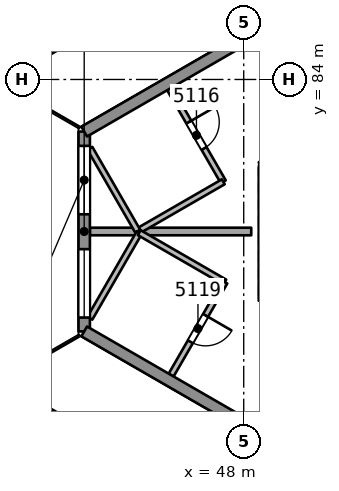
"""IFC4 building model, lengths in metres.
Left out: names, types, materials, properties, quantities, classifications, styles, units other than length and angle.
Written with IfcOpenShell. Run it as: python <this file> out.ifc"""

import sys

from ifc_helpers import new_model, si_unit, direction, frame, frame_2d, origin, place, context, subcontext, project, spatial, rectangle, extrude, element, fill, save


model = new_model("IFC4")
c1 = context("Model", 3, precision=1e-05, world=origin(), true_north=direction((0.0, 1.0)))
c2 = subcontext(c1, "Body", "Model", "MODEL_VIEW")
j1 = project(units=[si_unit("LENGTHUNIT", "METRE"), si_unit("PLANEANGLEUNIT", "RADIAN")], contexts=[c1])
p1 = place(None, origin())
s1 = spatial("IfcSite", under=j1, at=p1, CompositionType="ELEMENT")
p2 = place(p1, origin())
s2 = spatial("IfcBuilding", under=s1, at=p2, CompositionType="ELEMENT")
p3 = place(p2, frame((0.0, 0.0, 209.5)))
s3 = spatial("IfcBuildingStorey", under=s2, at=p3, CompositionType="ELEMENT", Elevation=209.5)
p4 = place(p3, frame((60.728, 88.682, 0.0), z_axis=(0.0, 0.0, 1.0), x_axis=(-0.866021613849, -0.500006564303, 0.0)))
e1 = element("IfcWall", 1, at=p4, inside=s3, PredefinedType="SHEAR", context=c2, shape_type="SweptSolid", body=[
    extrude(rectangle(XDim=14.108, YDim=0.45, at=frame_2d((7.054, 0.0))), origin(), (0.0, 0.0, 1.0), 3.7),
])
p5 = place(p3, frame((48.622, 81.693, 0.0), z_axis=(0.0, 0.0, 1.0), x_axis=(0.0, -1.0, 0.0)))
e2 = element("IfcWall", 2, at=p5, inside=s3, PredefinedType="SHEAR", context=c2, shape_type="SweptSolid", body=[
    extrude(rectangle(XDim=3.515, YDim=0.45, at=frame_2d((1.758, 0.0))), origin(), (0.0, 0.0, 1.0), 3.7),
])
p6 = place(p3, frame((46.05, 83.755, 0.0), z_axis=(0.0, 0.0, 1.0), x_axis=(0.500051559782, -0.865995633684, 0.0)))
e3 = element("IfcWall", 3, at=p6, inside=s3, PredefinedType="PARTITIONING", context=c2, shape_type="SweptSolid", body=[
    extrude(rectangle(XDim=2.825, YDim=0.15, at=frame_2d((1.413, 0.0))), origin(), (0.0, 0.0, 1.0), 3.3),
])
p7 = place(p6, frame((1.013, 0.0, 0.0)))
e4 = element("IfcOpeningElement", 4, at=p7, cuts=e3, PredefinedType="OPENING", context=c2, shape_type="SweptSolid", body=[
    extrude(rectangle(XDim=0.8, YDim=2.1, at=frame_2d((0.4, 1.05))), frame((0.0, 0.085, 0.0), z_axis=(0.0, -1.0, 0.0), x_axis=(1.0, 0.0, 0.0)), (0.0, 0.0, 1.0), 0.171),
])
p8 = place(p3, frame((47.462, 81.308, 0.0), z_axis=(0.0, 0.0, 1.0), x_axis=(-0.866021400173, -0.500006934395, 0.0)))
e5 = element("IfcWall", 5, at=p8, inside=s3, PredefinedType="PARTITIONING", context=c2, shape_type="SweptSolid", body=[
    extrude(rectangle(XDim=2.6, YDim=0.15, at=frame_2d((1.3, 0.0))), origin(), (0.0, 0.0, 1.0), 3.3),
])
p9 = place(p3, frame((45.211, 80.008, 0.0), z_axis=(0.0, 0.0, 1.0), x_axis=(-0.499954589381, 0.86605162003, 0.0)))
e6 = element("IfcWall", 6, at=p9, inside=s3, PredefinedType="PARTITIONING", context=c2, shape_type="SweptSolid", body=[
    extrude(rectangle(XDim=2.519, YDim=0.15, at=frame_2d((1.259, 0.0))), origin(), (0.0, 0.0, 1.0), 3.3),
])
p10 = place(p3, frame((43.951, 80.0, 0.0), z_axis=(0.0, 0.0, 1.0), x_axis=(1.0, 0.0, 0.0)))
e7 = element("IfcWall", 7, at=p10, inside=s3, PredefinedType="PARTITIONING", context=c2, shape_type="SweptSolid", body=[
    extrude(rectangle(XDim=4.247, YDim=0.2, at=frame_2d((2.123, 0.0))), origin(), (0.0, 0.0, 1.0), 3.3),
])
p11 = place(p3, frame((43.951, 77.718, 0.0), z_axis=(0.0, 0.0, 1.0), x_axis=(0.499988060406, 0.866032297002, 0.0)))
e8 = element("IfcWall", 8, at=p11, inside=s3, PredefinedType="PARTITIONING", context=c2, shape_type="SweptSolid", body=[
    extrude(rectangle(XDim=2.599, YDim=0.15, at=frame_2d((1.3, 0.0))), origin(), (0.0, 0.0, 1.0), 3.3),
])
p12 = place(p3, frame((45.251, 79.969, 0.0), z_axis=(0.0, 0.0, 1.0), x_axis=(0.866062058628, -0.499936506574, 0.0)))
e9 = element("IfcWall", 9, at=p12, inside=s3, PredefinedType="PARTITIONING", context=c2, shape_type="SweptSolid", body=[
    extrude(rectangle(XDim=2.6, YDim=0.15, at=frame_2d((1.3, 0.0))), origin(), (0.0, 0.0, 1.0), 3.3),
])
p13 = place(p3, frame((47.503, 78.669, 0.0), z_axis=(0.0, 0.0, 1.0), x_axis=(-0.500014143148, -0.86601723808, 0.0)))
e10 = element("IfcWall", 10, at=p13, inside=s3, PredefinedType="PARTITIONING", context=c2, shape_type="SweptSolid", body=[
    extrude(rectangle(XDim=2.826, YDim=0.15, at=frame_2d((1.413, 0.0))), origin(), (0.0, 0.0, 1.0), 3.3),
])
p14 = place(p13, frame((1.013, 0.0, 0.0)))
e11 = element("IfcOpeningElement", 11, at=p14, cuts=e10, PredefinedType="OPENING", context=c2, shape_type="SweptSolid", body=[
    extrude(rectangle(XDim=0.8, YDim=2.1, at=frame_2d((0.4, 1.05))), frame((0.0, 0.085, 0.0), z_axis=(0.0, -1.0, 0.0), x_axis=(1.0, 0.0, 0.0)), (0.0, 0.0, 1.0), 0.171),
])
p15 = place(p3, frame((43.802, 77.37, 0.0), z_axis=(0.0, 0.0, 1.0), x_axis=(0.0, 1.0, 0.0)))
e12 = element("IfcWall", 12, at=p15, inside=s3, PredefinedType="SOLIDWALL", context=c2, shape_type="SweptSolid", body=[
    extrude(rectangle(XDim=5.259, YDim=0.3, at=frame_2d((2.63, 0.0))), origin(), (0.0, 0.0, 1.0), 3.3),
])
p16 = place(p15, frame((3.082, 0.0, 0.9)))
e13 = element("IfcOpeningElement", 13, at=p16, cuts=e12, PredefinedType="OPENING", context=c2, shape_type="SweptSolid", body=[
    extrude(rectangle(XDim=1.8, YDim=1.5, at=frame_2d((0.9, 0.75))), frame((0.0, 0.161, 0.0), z_axis=(0.0, -1.0, 0.0), x_axis=(1.0, 0.0, 0.0)), (0.0, 0.0, 1.0), 0.321),
])
p17 = place(p15, frame((0.365, 0.0, 0.9)))
e14 = element("IfcOpeningElement", 14, at=p17, cuts=e12, PredefinedType="OPENING", context=c2, shape_type="SweptSolid", body=[
    extrude(rectangle(XDim=1.8, YDim=1.5, at=frame_2d((0.9, 0.75))), frame((0.0, 0.161, 0.0), z_axis=(0.0, -1.0, 0.0), x_axis=(1.0, 0.0, 0.0)), (0.0, 0.0, 1.0), 0.321),
])
p18 = place(p3, frame((43.802, 82.63, 0.0), z_axis=(0.0, 0.0, 1.0), x_axis=(0.866026224187, 0.499998579018, 0.0)))
e15 = element("IfcWall", 15, at=p18, inside=s3, PredefinedType="SOLIDWALL", context=c2, shape_type="SweptSolid", body=[
    extrude(rectangle(XDim=51.406, YDim=0.3, at=frame_2d((25.703, 0.0))), origin(), (0.0, 0.0, 1.0), 3.3),
])
p19 = place(p18, frame((24.503, 0.0, 0.0)))
e16 = element("IfcOpeningElement", 16, at=p19, cuts=e15, PredefinedType="OPENING", context=c2, shape_type="SweptSolid", body=[
    extrude(rectangle(XDim=2.4, YDim=2.4, at=frame_2d((1.2, 1.2))), frame((0.0, 0.161, 0.0), z_axis=(0.0, -1.0, 0.0), x_axis=(1.0, 0.0, 0.0)), (0.0, 0.0, 1.0), 0.321),
])
p20 = place(p18, frame((30.271, 0.0, 0.0)))
e17 = element("IfcOpeningElement", 17, at=p20, cuts=e15, PredefinedType="OPENING", context=c2, shape_type="SweptSolid", body=[
    extrude(rectangle(XDim=2.4, YDim=2.4, at=frame_2d((1.2, 1.2))), frame((0.0, 0.161, 0.0), z_axis=(0.0, -1.0, 0.0), x_axis=(1.0, 0.0, 0.0)), (0.0, 0.0, 1.0), 0.321),
])
p21 = place(p18, frame((39.983, 0.0, 0.0)))
e18 = element("IfcOpeningElement", 18, at=p21, cuts=e15, PredefinedType="OPENING", context=c2, shape_type="SweptSolid", body=[
    extrude(rectangle(XDim=2.4, YDim=2.4, at=frame_2d((1.2, 1.2))), frame((0.0, 0.161, 0.0), z_axis=(0.0, -1.0, 0.0), x_axis=(1.0, 0.0, 0.0)), (0.0, 0.0, 1.0), 0.321),
])
p22 = place(p18, frame((18.736, 0.0, 0.0)))
e19 = element("IfcOpeningElement", 19, at=p22, cuts=e15, PredefinedType="OPENING", context=c2, shape_type="SweptSolid", body=[
    extrude(rectangle(XDim=2.4, YDim=2.4, at=frame_2d((1.2, 1.2))), frame((0.0, 0.161, 0.0), z_axis=(0.0, -1.0, 0.0), x_axis=(1.0, 0.0, 0.0)), (0.0, 0.0, 1.0), 0.321),
])
p23 = place(p18, frame((9.0, 0.0, 0.0)))
e20 = element("IfcOpeningElement", 20, at=p23, cuts=e15, PredefinedType="OPENING", context=c2, shape_type="SweptSolid", body=[
    extrude(rectangle(XDim=2.4, YDim=2.4, at=frame_2d((1.2, 1.2))), frame((0.0, 0.161, 0.0), z_axis=(0.0, -1.0, 0.0), x_axis=(1.0, 0.0, 0.0)), (0.0, 0.0, 1.0), 0.321),
])
p24 = place(p3, frame((88.322, 51.667, 0.0), z_axis=(0.0, 0.0, 1.0), x_axis=(-0.866026224187, 0.499998579018, 0.0)))
e21 = element("IfcWall", 21, at=p24, inside=s3, PredefinedType="SOLIDWALL", context=c2, shape_type="SweptSolid", body=[
    extrude(rectangle(XDim=51.406, YDim=0.3, at=frame_2d((25.703, 0.0))), origin(), (0.0, 0.0, 1.0), 3.3),
])
p25 = place(p24, frame((29.803, 0.0, 0.0)))
e22 = element("IfcOpeningElement", 22, at=p25, cuts=e21, PredefinedType="OPENING", context=c2, shape_type="SweptSolid", body=[
    extrude(rectangle(XDim=2.4, YDim=2.4, at=frame_2d((1.2, 1.2))), frame((0.0, 0.161, 0.0), z_axis=(0.0, -1.0, 0.0), x_axis=(1.0, 0.0, 0.0)), (0.0, 0.0, 1.0), 0.321),
])
p26 = place(p24, frame((39.983, 0.0, 0.0)))
e23 = element("IfcOpeningElement", 23, at=p26, cuts=e21, PredefinedType="OPENING", context=c2, shape_type="SweptSolid", body=[
    extrude(rectangle(XDim=2.4, YDim=2.4, at=frame_2d((1.2, 1.2))), frame((0.0, 0.161, 0.0), z_axis=(0.0, -1.0, 0.0), x_axis=(1.0, 0.0, 0.0)), (0.0, 0.0, 1.0), 0.321),
])
p27 = place(p24, frame((19.827, 0.0, 0.0)))
e24 = element("IfcOpeningElement", 24, at=p27, cuts=e21, PredefinedType="OPENING", context=c2, shape_type="SweptSolid", body=[
    extrude(rectangle(XDim=2.4, YDim=2.4, at=frame_2d((1.2, 1.2))), frame((0.0, 0.161, 0.0), z_axis=(0.0, -1.0, 0.0), x_axis=(1.0, 0.0, 0.0)), (0.0, 0.0, 1.0), 0.321),
])
p28 = place(p24, frame((9.0, 0.0, 0.0)))
e25 = element("IfcOpeningElement", 25, at=p28, cuts=e21, PredefinedType="OPENING", context=c2, shape_type="SweptSolid", body=[
    extrude(rectangle(XDim=2.4, YDim=2.4, at=frame_2d((1.2, 1.2))), frame((0.0, 0.161, 0.0), z_axis=(0.0, -1.0, 0.0), x_axis=(1.0, 0.0, 0.0)), (0.0, 0.0, 1.0), 0.321),
])
p29 = place(p24, frame((25.427, 0.0, 0.9)))
e26 = element("IfcOpeningElement", 26, at=p29, cuts=e21, PredefinedType="OPENING", context=c2, shape_type="SweptSolid", body=[
    extrude(rectangle(XDim=1.8, YDim=1.5, at=frame_2d((0.9, 0.75))), frame((0.0, 0.161, 0.0), z_axis=(0.0, -1.0, 0.0), x_axis=(1.0, 0.0, 0.0)), (0.0, 0.0, 1.0), 0.321),
])
p30 = place(p7, origin())
e27 = element("IfcDoor", 27, at=p30, inside=s3, OperationType="SINGLE_SWING_LEFT", PredefinedType="NOTDEFINED", context=c2, shape_type="SweptSolid", body=[
    extrude(rectangle(XDim=0.8, YDim=2.1, at=frame_2d((0.4, 1.05))), frame((0.0, 0.025, 0.0), z_axis=(0.0, -1.0, 0.0), x_axis=(1.0, 0.0, 0.0)), (0.0, 0.0, 1.0), 0.05),
])
fill(e4, e27)
p31 = place(p14, origin())
e28 = element("IfcDoor", 28, at=p31, inside=s3, OperationType="SINGLE_SWING_LEFT", PredefinedType="NOTDEFINED", context=c2, shape_type="SweptSolid", body=[
    extrude(rectangle(XDim=0.8, YDim=2.1, at=frame_2d((0.4, 1.05))), frame((0.0, 0.025, 0.0), z_axis=(0.0, -1.0, 0.0), x_axis=(1.0, 0.0, 0.0)), (0.0, 0.0, 1.0), 0.05),
])
fill(e11, e28)
p32 = place(p16, origin())
e29 = element("IfcWindow", 29, at=p32, inside=s3, PartitioningType="SINGLE_PANEL", PredefinedType="WINDOW", context=c2, shape_type="SweptSolid", body=[
    extrude(rectangle(XDim=1.8, YDim=1.5, at=frame_2d((0.9, 0.75))), frame((0.0, 0.03, 0.0), z_axis=(0.0, -1.0, 0.0), x_axis=(1.0, 0.0, 0.0)), (0.0, 0.0, 1.0), 0.06),
])
fill(e13, e29)
p33 = place(p17, origin())
e30 = element("IfcWindow", 30, at=p33, inside=s3, PartitioningType="SINGLE_PANEL", PredefinedType="WINDOW", context=c2, shape_type="SweptSolid", body=[
    extrude(rectangle(XDim=1.8, YDim=1.5, at=frame_2d((0.9, 0.75))), frame((0.0, 0.03, 0.0), z_axis=(0.0, -1.0, 0.0), x_axis=(1.0, 0.0, 0.0)), (0.0, 0.0, 1.0), 0.06),
])
fill(e14, e30)
save(model, sys.argv[1])
